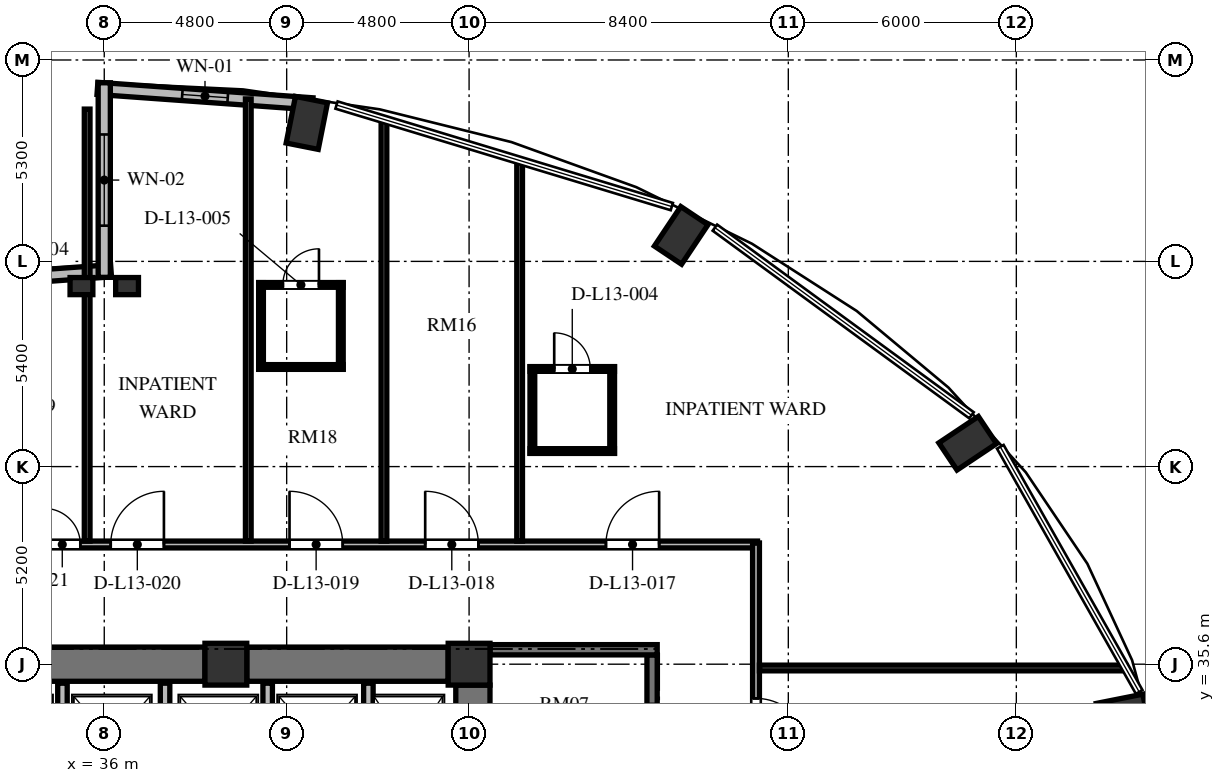
"""IFC4 building model, lengths in metres.
Left out: names, types, materials, properties, quantities, classifications, styles, units other than length and angle.
Written with IfcOpenShell. Run it as: python <this file> out.ifc"""

import sys

from ifc_helpers import new_model, si_unit, direction, frame, frame_2d, origin, origin_2d, place, context, subcontext, project, spatial, rectangle, extrude, element, fill, save


model = new_model("IFC4")
c1 = context("Model", 3, precision=1e-05, world=origin(), true_north=direction((0.0, 1.0)))
c2 = subcontext(c1, "Body", "Model", "MODEL_VIEW")
j1 = project(units=[si_unit("LENGTHUNIT", "METRE"), si_unit("PLANEANGLEUNIT", "RADIAN")], contexts=[c1])
p1 = place(None, origin())
s1 = spatial("IfcSite", under=j1, at=p1, CompositionType="ELEMENT")
p2 = place(p1, origin())
s2 = spatial("IfcBuilding", under=s1, at=p2, CompositionType="ELEMENT")
p3 = place(p2, frame((0.0, 0.0, 54.384)))
s3 = spatial("IfcBuildingStorey", under=s2, at=p3, CompositionType="ELEMENT", Elevation=54.384)
for number, where, z_axis, x_axis in (
    (1, (62.8, 34.268, 0.0), (0.0, 0.0, 1.0), (0.981, 0.195, 0.0)),
    (2, (58.72, 41.414, 0.0), (0.0, 0.0, 1.0), (0.831, 0.556, 0.0)),
    (3, (51.181, 46.884, 0.0), (0.0, 0.0, 1.0), (0.556, 0.831, 0.0)),
    (4, (41.331, 49.844, 0.0), (0.0, 0.0, 1.0), (0.195, 0.981, 0.0)),
):
    element("IfcColumn", number, at=place(p3, frame(where, z_axis=z_axis, x_axis=x_axis)), inside=s3, PredefinedType="COLUMN", context=c2, shape_type="SweptSolid", body=[
        extrude(rectangle(XDim=1.25, YDim=0.86, at=origin_2d()), origin(), (0.0, 0.0, 1.0), 3.648),
    ])
for number, where, z_axis, x_axis in (
    (5, (45.6, 35.6, 0.0), (0.0, 0.0, 1.0), (1.0, 0.0, 0.0)),
    (6, (39.2, 35.6, 0.0), (0.0, 0.0, 1.0), (1.0, 0.0, 0.0)),
):
    element("IfcColumn", number, at=place(p3, frame(where, z_axis=z_axis, x_axis=x_axis)), inside=s3, PredefinedType="COLUMN", context=c2, shape_type="SweptSolid", body=[
        extrude(rectangle(XDim=1.1, YDim=1.1, at=origin_2d()), origin(), (0.0, 0.0, 1.0), 3.648),
    ])
for number, where, z_axis, x_axis in (
    (7, (35.4, 45.55, 0.0), (0.0, 0.0, 1.0), (1.0, 0.0, 0.0)),
    (8, (36.6, 45.55, 0.0), (0.0, 0.0, 1.0), (1.0, 0.0, 0.0)),
):
    element("IfcColumn", number, at=place(p3, frame(where, z_axis=z_axis, x_axis=x_axis)), inside=s3, PredefinedType="PILASTER", context=c2, shape_type="SweptSolid", body=[
        extrude(rectangle(XDim=0.6, YDim=0.45, at=origin_2d()), origin(), (0.0, 0.0, 1.0), 3.648),
    ])
p4 = place(p3, frame((45.7, 20.95, 0.0), z_axis=(0.0, 0.0, 1.0), x_axis=(0.0, 1.0, 0.0)))
e9 = element("IfcWall", 9, at=p4, inside=s3, PredefinedType="SHEAR", context=c2, shape_type="SweptSolid", body=[
    extrude(rectangle(XDim=14.1, YDim=0.9, at=frame_2d((7.05, 0.0))), origin(), (0.0, 0.0, 1.0), 3.648),
])
p5 = place(p4, frame((11.75, 0.0, 0.0)))
e10 = element("IfcOpeningElement", 10, at=p5, cuts=e9, PredefinedType="OPENING", context=c2, shape_type="SweptSolid", body=[
    extrude(rectangle(XDim=1.4, YDim=2.3, at=frame_2d((0.7, 1.15))), frame((0.0, 0.46, 0.0), z_axis=(0.0, -1.0, 0.0), x_axis=(1.0, 0.0, 0.0)), (0.0, 0.0, 1.0), 0.92),
])
p6 = place(p4, frame((0.95, 0.0, 0.0)))
e11 = element("IfcOpeningElement", 11, at=p6, cuts=e9, PredefinedType="OPENING", context=c2, shape_type="SweptSolid", body=[
    extrude(rectangle(XDim=1.4, YDim=2.3, at=frame_2d((0.7, 1.15))), frame((0.0, 0.46, 0.0), z_axis=(0.0, -1.0, 0.0), x_axis=(1.0, 0.0, 0.0)), (0.0, 0.0, 1.0), 0.92),
])
p7 = place(p3, frame((33.35, 35.6, 0.0), z_axis=(0.0, 0.0, 1.0), x_axis=(1.0, 0.0, 0.0)))
e12 = element("IfcWall", 12, at=p7, inside=s3, PredefinedType="SHEAR", context=c2, shape_type="SweptSolid", body=[
    extrude(rectangle(XDim=5.3, YDim=0.9, at=frame_2d((2.65, 0.0))), origin(), (0.0, 0.0, 1.0), 3.648),
])
p8 = place(p3, frame((39.75, 35.6, 0.0), z_axis=(0.0, 0.0, 1.0), x_axis=(1.0, 0.0, 0.0)))
e13 = element("IfcWall", 13, at=p8, inside=s3, PredefinedType="SHEAR", context=c2, shape_type="SweptSolid", body=[
    extrude(rectangle(XDim=5.3, YDim=0.9, at=frame_2d((2.65, 0.0))), origin(), (0.0, 0.0, 1.0), 3.648),
])
p9 = place(p3, frame((41.481, 50.346, 0.0), z_axis=(0.0, 0.0, 1.0), x_axis=(-0.997422321809, 0.071754525696, 0.0)))
e14 = element("IfcWall", 14, at=p9, inside=s3, PredefinedType="SOLIDWALL", context=c2, shape_type="SweptSolid", body=[
    extrude(rectangle(XDim=5.675, YDim=0.32, at=frame_2d((2.838, 0.0))), origin(), (0.0, 0.0, 1.0), 3.428),
])
p10 = place(p9, frame((2.238, 0.0, 0.85)))
e15 = element("IfcOpeningElement", 15, at=p10, cuts=e14, PredefinedType="OPENING", context=c2, shape_type="SweptSolid", body=[
    extrude(rectangle(XDim=1.2, YDim=2.2, at=frame_2d((0.6, 1.1))), frame((0.0, 0.17, 0.0), z_axis=(0.0, -1.0, 0.0), x_axis=(1.0, 0.0, 0.0)), (0.0, 0.0, 1.0), 0.34),
])
p11 = place(p3, frame((36.179, 45.953, 0.0), z_axis=(0.0, 0.0, 1.0), x_axis=(-0.997421878774, -0.071760683825, 0.0)))
e16 = element("IfcWall", 16, at=p11, inside=s3, PredefinedType="SOLIDWALL", context=c2, shape_type="SweptSolid", body=[
    extrude(rectangle(XDim=5.675, YDim=0.32, at=frame_2d((2.837, 0.0))), origin(), (0.0, 0.0, 1.0), 3.428),
])
p12 = place(p11, frame((2.007, 0.0, 0.85)))
e17 = element("IfcOpeningElement", 17, at=p12, cuts=e16, PredefinedType="OPENING", context=c2, shape_type="SweptSolid", body=[
    extrude(rectangle(XDim=1.2, YDim=1.8, at=frame_2d((0.6, 0.9))), frame((0.0, 0.17, 0.0), z_axis=(0.0, -1.0, 0.0), x_axis=(1.0, 0.0, 0.0)), (0.0, 0.0, 1.0), 0.34),
])
p13 = place(p3, frame((36.0, 50.9, 0.0), z_axis=(0.0, 0.0, 1.0), x_axis=(0.0, -1.0, 0.0)))
e18 = element("IfcWall", 18, at=p13, inside=s3, PredefinedType="SOLIDWALL", context=c2, shape_type="SweptSolid", body=[
    extrude(rectangle(XDim=5.12, YDim=0.32, at=frame_2d((2.56, 0.0))), origin(), (0.0, 0.0, 1.0), 3.428),
])
p14 = place(p13, frame((1.36, 0.0, 0.84)))
e19 = element("IfcOpeningElement", 19, at=p14, cuts=e18, PredefinedType="OPENING", context=c2, shape_type="SweptSolid", body=[
    extrude(rectangle(XDim=2.4, YDim=2.04, at=frame_2d((1.2, 1.02))), frame((0.0, 0.17, 0.0), z_axis=(0.0, -1.0, 0.0), x_axis=(1.0, 0.0, 0.0)), (0.0, 0.0, 1.0), 0.34),
])
p15 = place(p3, frame((42.95, 31.92, 0.0), z_axis=(0.0, 0.0, 1.0), x_axis=(0.0, 1.0, 0.0)))
e20 = element("IfcWall", 20, at=p15, inside=s3, PredefinedType="SOLIDWALL", context=c2, shape_type="SweptSolid", body=[
    extrude(rectangle(XDim=3.18, YDim=0.25, at=frame_2d((1.59, 0.0))), origin(), (0.0, 0.0, 1.0), 3.428),
])
for number, where, z_axis, x_axis in (
    (21, (34.9, 32.42, 0.0), (0.0, 0.0, 1.0), (0.0, 1.0, 0.0)),
    (22, (37.6, 32.42, 0.0), (0.0, 0.0, 1.0), (0.0, 1.0, 0.0)),
    (23, (40.3, 32.42, 0.0), (0.0, 0.0, 1.0), (0.0, 1.0, 0.0)),
):
    element("IfcWall", number, at=place(p3, frame(where, z_axis=z_axis, x_axis=x_axis)), inside=s3, PredefinedType="SOLIDWALL", context=c2, shape_type="SweptSolid", body=[
        extrude(rectangle(XDim=2.68, YDim=0.25, at=frame_2d((1.34, 0.0))), origin(), (0.0, 0.0, 1.0), 3.428),
    ])
p16 = place(p3, frame((50.415, 35.845, 0.0), z_axis=(0.0, 0.0, 1.0), x_axis=(0.0, -1.0, 0.0)))
e24 = element("IfcWall", 24, at=p16, inside=s3, PredefinedType="SHEAR", context=c2, shape_type="SweptSolid", body=[
    extrude(rectangle(XDim=15.825, YDim=0.27, at=frame_2d((7.913, 0.0))), origin(), (0.0, 0.0, 1.0), 3.648),
])
p17 = place(p16, frame((4.445, 0.0, 0.0)))
e25 = element("IfcOpeningElement", 25, at=p17, cuts=e24, PredefinedType="OPENING", context=c2, shape_type="SweptSolid", body=[
    extrude(rectangle(XDim=1.2, YDim=2.15, at=frame_2d((0.6, 1.075))), frame((0.0, 0.145, 0.0), z_axis=(0.0, -1.0, 0.0), x_axis=(1.0, 0.0, 0.0)), (0.0, 0.0, 1.0), 0.29),
])
p18 = place(p16, frame((1.295, 0.0, 0.0)))
e26 = element("IfcOpeningElement", 26, at=p18, cuts=e24, PredefinedType="OPENING", context=c2, shape_type="SweptSolid", body=[
    extrude(rectangle(XDim=1.3, YDim=2.2, at=frame_2d((0.65, 1.1))), frame((0.0, 0.145, 0.0), z_axis=(0.0, -1.0, 0.0), x_axis=(1.0, 0.0, 0.0)), (0.0, 0.0, 1.0), 0.29),
])
p19 = place(p16, frame((13.095, 0.0, 0.0)))
e27 = element("IfcOpeningElement", 27, at=p19, cuts=e24, PredefinedType="OPENING", context=c2, shape_type="SweptSolid", body=[
    extrude(rectangle(XDim=1.3, YDim=2.2, at=frame_2d((0.65, 1.1))), frame((0.0, 0.145, 0.0), z_axis=(0.0, -1.0, 0.0), x_axis=(1.0, 0.0, 0.0)), (0.0, 0.0, 1.0), 0.29),
])
p20 = place(p3, frame((46.15, 35.98, 0.0), z_axis=(0.0, 0.0, 1.0), x_axis=(1.0, 0.0, 0.0)))
e28 = element("IfcWall", 28, at=p20, inside=s3, PredefinedType="SHEAR", context=c2, shape_type="SweptSolid", body=[
    extrude(rectangle(XDim=4.4, YDim=0.27, at=frame_2d((2.2, 0.0))), origin(), (0.0, 0.0, 1.0), 3.648),
])
p21 = place(p3, frame((23.31, 38.75, 0.0), z_axis=(0.0, 0.0, 1.0), x_axis=(1.0, 0.0, 0.0)))
e29 = element("IfcWall", 29, at=p21, inside=s3, PredefinedType="PARTITIONING", context=c2, shape_type="SweptSolid", body=[
    extrude(rectangle(XDim=29.88, YDim=0.18, at=frame_2d((14.94, 0.0))), origin(), (0.0, 0.0, 1.0), 3.053),
])
p22 = place(p21, frame((25.891, 0.0, 0.0)))
e30 = element("IfcOpeningElement", 30, at=p22, cuts=e29, PredefinedType="OPENING", context=c2, shape_type="SweptSolid", body=[
    extrude(rectangle(XDim=1.4, YDim=2.2, at=frame_2d((0.7, 1.1))), frame((0.0, 0.1, 0.0), z_axis=(0.0, -1.0, 0.0), x_axis=(1.0, 0.0, 0.0)), (0.0, 0.0, 1.0), 0.2),
])
p23 = place(p21, frame((21.135, 0.0, 0.0)))
e31 = element("IfcOpeningElement", 31, at=p23, cuts=e29, PredefinedType="OPENING", context=c2, shape_type="SweptSolid", body=[
    extrude(rectangle(XDim=1.4, YDim=2.2, at=frame_2d((0.7, 1.1))), frame((0.0, 0.1, 0.0), z_axis=(0.0, -1.0, 0.0), x_axis=(1.0, 0.0, 0.0)), (0.0, 0.0, 1.0), 0.2),
])
p24 = place(p21, frame((17.565, 0.0, 0.0)))
e32 = element("IfcOpeningElement", 32, at=p24, cuts=e29, PredefinedType="OPENING", context=c2, shape_type="SweptSolid", body=[
    extrude(rectangle(XDim=1.4, YDim=2.2, at=frame_2d((0.7, 1.1))), frame((0.0, 0.1, 0.0), z_axis=(0.0, -1.0, 0.0), x_axis=(1.0, 0.0, 0.0)), (0.0, 0.0, 1.0), 0.2),
])
p25 = place(p21, frame((12.86, 0.0, 0.0)))
e33 = element("IfcOpeningElement", 33, at=p25, cuts=e29, PredefinedType="OPENING", context=c2, shape_type="SweptSolid", body=[
    extrude(rectangle(XDim=1.4, YDim=2.2, at=frame_2d((0.7, 1.1))), frame((0.0, 0.1, 0.0), z_axis=(0.0, -1.0, 0.0), x_axis=(1.0, 0.0, 0.0)), (0.0, 0.0, 1.0), 0.2),
])
p26 = place(p21, frame((11.11, 0.0, 0.0)))
e34 = element("IfcOpeningElement", 34, at=p26, cuts=e29, PredefinedType="OPENING", context=c2, shape_type="SweptSolid", body=[
    extrude(rectangle(XDim=0.95, YDim=2.1, at=frame_2d((0.475, 1.05))), frame((0.0, 0.1, 0.0), z_axis=(0.0, -1.0, 0.0), x_axis=(1.0, 0.0, 0.0)), (0.0, 0.0, 1.0), 0.2),
])
p27 = place(p21, frame((6.845, 0.0, 0.0)))
e35 = element("IfcOpeningElement", 35, at=p27, cuts=e29, PredefinedType="OPENING", context=c2, shape_type="SweptSolid", body=[
    extrude(rectangle(XDim=1.4, YDim=2.2, at=frame_2d((0.7, 1.1))), frame((0.0, 0.1, 0.0), z_axis=(0.0, -1.0, 0.0), x_axis=(1.0, 0.0, 0.0)), (0.0, 0.0, 1.0), 0.2),
])
p28 = place(p21, frame((2.339, 0.0, 0.0)))
e36 = element("IfcOpeningElement", 36, at=p28, cuts=e29, PredefinedType="OPENING", context=c2, shape_type="SweptSolid", body=[
    extrude(rectangle(XDim=1.4, YDim=2.2, at=frame_2d((0.7, 1.1))), frame((0.0, 0.1, 0.0), z_axis=(0.0, -1.0, 0.0), x_axis=(1.0, 0.0, 0.0)), (0.0, 0.0, 1.0), 0.2),
])
p29 = place(p3, frame((53.15, 38.79, 0.0), z_axis=(0.0, 0.0, 1.0), x_axis=(0.0, -1.0, 0.0)))
e37 = element("IfcWall", 37, at=p29, inside=s3, PredefinedType="PARTITIONING", context=c2, shape_type="SweptSolid", body=[
    extrude(rectangle(XDim=9.43, YDim=0.18, at=frame_2d((4.715, 0.0))), origin(), (0.0, 0.0, 1.0), 3.428),
])
p30 = place(p29, frame((4.09, 0.0, 0.0)))
e38 = element("IfcOpeningElement", 38, at=p30, cuts=e37, PredefinedType="OPENING", context=c2, shape_type="SweptSolid", body=[
    extrude(rectangle(XDim=1.4, YDim=2.2, at=frame_2d((0.7, 1.1))), frame((0.0, 0.1, 0.0), z_axis=(0.0, -1.0, 0.0), x_axis=(1.0, 0.0, 0.0)), (0.0, 0.0, 1.0), 0.2),
])
p31 = place(p3, frame((53.24, 35.5, 0.0), z_axis=(0.0, 0.0, 1.0), x_axis=(1.0, 0.0, 0.0)))
e39 = element("IfcWall", 39, at=p31, inside=s3, PredefinedType="PARTITIONING", context=c2, shape_type="SweptSolid", body=[
    extrude(rectangle(XDim=9.632, YDim=0.15, at=frame_2d((4.816, 0.0))), origin(), (0.0, 0.0, 1.0), 3.428),
])
p32 = place(p3, frame((35.55, 38.84, 0.0), z_axis=(0.0, 0.0, 1.0), x_axis=(0.0, 1.0, 0.0)))
e40 = element("IfcWall", 40, at=p32, inside=s3, PredefinedType="PARTITIONING", context=c2, shape_type="SweptSolid", body=[
    extrude(rectangle(XDim=11.367, YDim=0.15, at=frame_2d((5.684, 0.0))), origin(), (0.0, 0.0, 1.0), 3.428),
])
p33 = place(p3, frame((39.79, 38.84, 0.0), z_axis=(0.0, 0.0, 1.0), x_axis=(0.0, 1.0, 0.0)))
e41 = element("IfcWall", 41, at=p33, inside=s3, PredefinedType="PARTITIONING", context=c2, shape_type="SweptSolid", body=[
    extrude(rectangle(XDim=11.635, YDim=0.15, at=frame_2d((5.817, 0.0))), origin(), (0.0, 0.0, 1.0), 2.813),
])
p34 = place(p3, frame((43.36, 38.84, 0.0), z_axis=(0.0, 0.0, 1.0), x_axis=(0.0, 1.0, 0.0)))
e42 = element("IfcWall", 42, at=p34, inside=s3, PredefinedType="PARTITIONING", context=c2, shape_type="SweptSolid", body=[
    extrude(rectangle(XDim=11.084, YDim=0.15, at=frame_2d((5.542, 0.0))), origin(), (0.0, 0.0, 1.0), 3.428),
])
p35 = place(p3, frame((46.93, 38.84, 0.0), z_axis=(0.0, 0.0, 1.0), x_axis=(0.0, 1.0, 0.0)))
e43 = element("IfcWall", 43, at=p35, inside=s3, PredefinedType="PARTITIONING", context=c2, shape_type="SweptSolid", body=[
    extrude(rectangle(XDim=10.003, YDim=0.15, at=frame_2d((5.001, 0.0))), origin(), (0.0, 0.0, 1.0), 3.428),
])
p36 = place(p3, frame((47.205, 43.369, 0.0), z_axis=(0.0, 0.0, 1.0), x_axis=(1.0, 0.0, 0.0)))
e44 = element("IfcWall", 44, at=p36, inside=s3, PredefinedType="PARTITIONING", context=c2, shape_type="SweptSolid", body=[
    extrude(rectangle(XDim=2.22, YDim=0.125, at=frame_2d((1.11, 0.0))), origin(), (0.0, 0.0, 1.0), 3.428),
])
p37 = place(p36, frame((0.635, 0.0, 0.0)))
e45 = element("IfcOpeningElement", 45, at=p37, cuts=e44, PredefinedType="OPENING", context=c2, shape_type="SweptSolid", body=[
    extrude(rectangle(XDim=0.95, YDim=2.1, at=frame_2d((0.475, 1.05))), frame((0.0, 0.073, 0.0), z_axis=(0.0, -1.0, 0.0), x_axis=(1.0, 0.0, 0.0)), (0.0, 0.0, 1.0), 0.145),
])
p38 = place(p3, frame((47.205, 41.209, 0.0), z_axis=(0.0, 0.0, 1.0), x_axis=(1.0, 0.0, 0.0)))
e46 = element("IfcWall", 46, at=p38, inside=s3, PredefinedType="PARTITIONING", context=c2, shape_type="SweptSolid", body=[
    extrude(rectangle(XDim=2.22, YDim=0.125, at=frame_2d((1.11, 0.0))), origin(), (0.0, 0.0, 1.0), 3.428),
])
for number, where, z_axis, x_axis in (
    (47, (49.365, 41.149, 0.0), (0.0, 0.0, 1.0), (0.0, 1.0, 0.0)),
    (48, (47.265, 41.149, 0.0), (0.0, 0.0, 1.0), (0.0, 1.0, 0.0)),
):
    element("IfcWall", number, at=place(p3, frame(where, z_axis=z_axis, x_axis=x_axis)), inside=s3, PredefinedType="PARTITIONING", context=c2, shape_type="SweptSolid", body=[
        extrude(rectangle(XDim=2.28, YDim=0.125, at=frame_2d((1.14, 0.0))), origin(), (0.0, 0.0, 1.0), 3.428),
    ])
p39 = place(p3, frame((40.065, 45.581, 0.0), z_axis=(0.0, 0.0, 1.0), x_axis=(1.0, 0.0, 0.0)))
e49 = element("IfcWall", 49, at=p39, inside=s3, PredefinedType="PARTITIONING", context=c2, shape_type="SweptSolid", body=[
    extrude(rectangle(XDim=2.22, YDim=0.125, at=frame_2d((1.11, 0.0))), origin(), (0.0, 0.0, 1.0), 3.428),
])
p40 = place(p39, frame((0.635, 0.0, 0.0)))
e50 = element("IfcOpeningElement", 50, at=p40, cuts=e49, PredefinedType="OPENING", context=c2, shape_type="SweptSolid", body=[
    extrude(rectangle(XDim=0.95, YDim=2.1, at=frame_2d((0.475, 1.05))), frame((0.0, 0.073, 0.0), z_axis=(0.0, -1.0, 0.0), x_axis=(1.0, 0.0, 0.0)), (0.0, 0.0, 1.0), 0.145),
])
p41 = place(p3, frame((40.065, 43.421, 0.0), z_axis=(0.0, 0.0, 1.0), x_axis=(1.0, 0.0, 0.0)))
e51 = element("IfcWall", 51, at=p41, inside=s3, PredefinedType="PARTITIONING", context=c2, shape_type="SweptSolid", body=[
    extrude(rectangle(XDim=2.22, YDim=0.125, at=frame_2d((1.11, 0.0))), origin(), (0.0, 0.0, 1.0), 3.428),
])
for number, where, z_axis, x_axis in (
    (52, (42.225, 43.361, 0.0), (0.0, 0.0, 1.0), (0.0, 1.0, 0.0)),
    (53, (40.125, 43.361, 0.0), (0.0, 0.0, 1.0), (0.0, 1.0, 0.0)),
):
    element("IfcWall", number, at=place(p3, frame(where, z_axis=z_axis, x_axis=x_axis)), inside=s3, PredefinedType="PARTITIONING", context=c2, shape_type="SweptSolid", body=[
        extrude(rectangle(XDim=2.28, YDim=0.125, at=frame_2d((1.14, 0.0))), origin(), (0.0, 0.0, 1.0), 3.428),
    ])
p42 = place(p10, origin())
e54 = element("IfcWindow", 54, at=p42, inside=s3, PartitioningType="SINGLE_PANEL", PredefinedType="WINDOW", context=c2, shape_type="SweptSolid", body=[
    extrude(rectangle(XDim=1.2, YDim=2.2, at=frame_2d((0.6, 1.1))), frame((0.0, 0.03, 0.0), z_axis=(0.0, -1.0, 0.0), x_axis=(1.0, 0.0, 0.0)), (0.0, 0.0, 1.0), 0.06),
])
fill(e15, e54)
p43 = place(p14, origin())
e55 = element("IfcWindow", 55, at=p43, inside=s3, PartitioningType="SINGLE_PANEL", PredefinedType="WINDOW", context=c2, shape_type="SweptSolid", body=[
    extrude(rectangle(XDim=2.4, YDim=2.04, at=frame_2d((1.2, 1.02))), frame((0.0, 0.03, 0.0), z_axis=(0.0, -1.0, 0.0), x_axis=(1.0, 0.0, 0.0)), (0.0, 0.0, 1.0), 0.06),
])
fill(e19, e55)
p44 = place(p30, origin())
e56 = element("IfcDoor", 56, at=p44, inside=s3, OperationType="SINGLE_SWING_RIGHT", PredefinedType="DOOR", context=c2, shape_type="SweptSolid", body=[
    extrude(rectangle(XDim=1.4, YDim=2.2, at=frame_2d((0.7, 1.1))), frame((0.0, 0.025, 0.0), z_axis=(0.0, -1.0, 0.0), x_axis=(1.0, 0.0, 0.0)), (0.0, 0.0, 1.0), 0.05),
])
fill(e38, e56)
p45 = place(p37, origin())
e57 = element("IfcDoor", 57, at=p45, inside=s3, OperationType="SINGLE_SWING_LEFT", PredefinedType="DOOR", context=c2, shape_type="SweptSolid", body=[
    extrude(rectangle(XDim=0.95, YDim=2.1, at=frame_2d((0.475, 1.05))), frame((0.0, 0.025, 0.0), z_axis=(0.0, -1.0, 0.0), x_axis=(1.0, 0.0, 0.0)), (0.0, 0.0, 1.0), 0.05),
])
fill(e45, e57)
p46 = place(p22, origin())
e58 = element("IfcDoor", 58, at=p46, inside=s3, OperationType="SINGLE_SWING_RIGHT", PredefinedType="DOOR", context=c2, shape_type="SweptSolid", body=[
    extrude(rectangle(XDim=1.4, YDim=2.2, at=frame_2d((0.7, 1.1))), frame((0.0, 0.025, 0.0), z_axis=(0.0, -1.0, 0.0), x_axis=(1.0, 0.0, 0.0)), (0.0, 0.0, 1.0), 0.05),
])
fill(e30, e58)
p47 = place(p23, origin())
e59 = element("IfcDoor", 59, at=p47, inside=s3, OperationType="SINGLE_SWING_LEFT", PredefinedType="DOOR", context=c2, shape_type="SweptSolid", body=[
    extrude(rectangle(XDim=1.4, YDim=2.2, at=frame_2d((0.7, 1.1))), frame((0.0, 0.025, 0.0), z_axis=(0.0, -1.0, 0.0), x_axis=(1.0, 0.0, 0.0)), (0.0, 0.0, 1.0), 0.05),
])
fill(e31, e59)
p48 = place(p40, origin())
e60 = element("IfcDoor", 60, at=p48, inside=s3, OperationType="SINGLE_SWING_RIGHT", PredefinedType="DOOR", context=c2, shape_type="SweptSolid", body=[
    extrude(rectangle(XDim=0.95, YDim=2.1, at=frame_2d((0.475, 1.05))), frame((0.0, 0.025, 0.0), z_axis=(0.0, -1.0, 0.0), x_axis=(1.0, 0.0, 0.0)), (0.0, 0.0, 1.0), 0.05),
])
fill(e50, e60)
p49 = place(p24, origin())
e61 = element("IfcDoor", 61, at=p49, inside=s3, OperationType="SINGLE_SWING_LEFT", PredefinedType="DOOR", context=c2, shape_type="SweptSolid", body=[
    extrude(rectangle(XDim=1.4, YDim=2.2, at=frame_2d((0.7, 1.1))), frame((0.0, 0.025, 0.0), z_axis=(0.0, -1.0, 0.0), x_axis=(1.0, 0.0, 0.0)), (0.0, 0.0, 1.0), 0.05),
])
fill(e32, e61)
p50 = place(p25, origin())
e62 = element("IfcDoor", 62, at=p50, inside=s3, OperationType="SINGLE_SWING_RIGHT", PredefinedType="DOOR", context=c2, shape_type="SweptSolid", body=[
    extrude(rectangle(XDim=1.4, YDim=2.2, at=frame_2d((0.7, 1.1))), frame((0.0, 0.025, 0.0), z_axis=(0.0, -1.0, 0.0), x_axis=(1.0, 0.0, 0.0)), (0.0, 0.0, 1.0), 0.05),
])
fill(e33, e62)
p51 = place(p26, origin())
e63 = element("IfcDoor", 63, at=p51, inside=s3, OperationType="SINGLE_SWING_LEFT", PredefinedType="DOOR", context=c2, shape_type="SweptSolid", body=[
    extrude(rectangle(XDim=0.95, YDim=2.1, at=frame_2d((0.475, 1.05))), frame((0.0, 0.025, 0.0), z_axis=(0.0, -1.0, 0.0), x_axis=(1.0, 0.0, 0.0)), (0.0, 0.0, 1.0), 0.05),
])
fill(e34, e63)
save(model, sys.argv[1])
